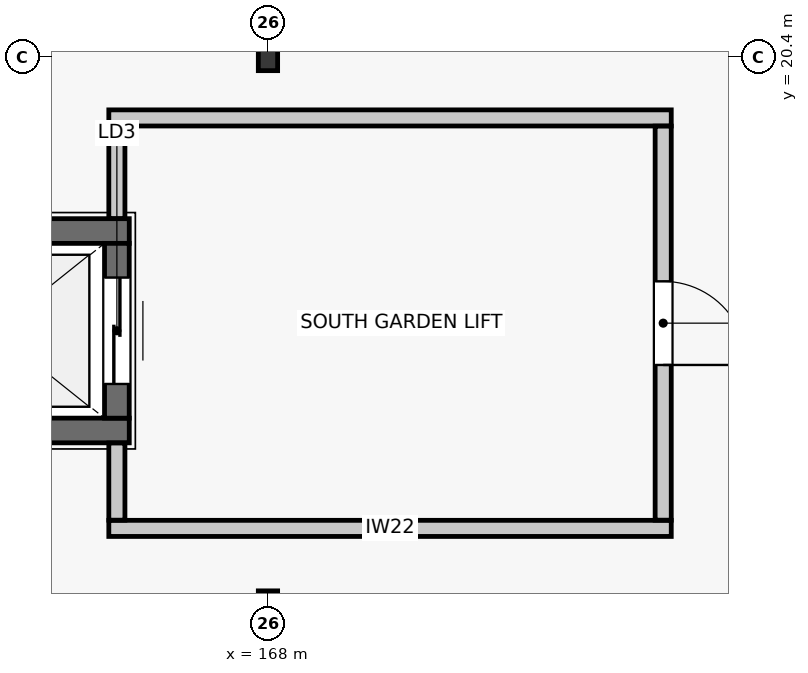
"""IFC4 building model, lengths in metres.
Left out: names, types, materials, properties, quantities, classifications, styles, units other than length and angle.
Written with IfcOpenShell. Run it as: python <this file> out.ifc"""

import sys

from ifc_helpers import new_model, si_unit, direction, frame, frame_2d, origin, origin_2d, place, context, subcontext, project, spatial, rectangle, i_section, extrude, element, fill, save


model = new_model("IFC4")
c1 = context("Model", 3, precision=1e-05, world=origin(), true_north=direction((0.0, 1.0)))
c2 = subcontext(c1, "Body", "Model", "MODEL_VIEW")
j1 = project(units=[si_unit("LENGTHUNIT", "METRE"), si_unit("PLANEANGLEUNIT", "RADIAN")], contexts=[c1])
p1 = place(None, origin())
s1 = spatial("IfcSite", under=j1, at=p1, CompositionType="ELEMENT")
p2 = place(p1, origin())
s2 = spatial("IfcBuilding", under=s1, at=p2, CompositionType="ELEMENT")
p3 = place(p2, frame((0.0, 0.0, 13.2)))
s3 = spatial("IfcBuildingStorey", under=s2, at=p3, CompositionType="ELEMENT", Elevation=13.2)
for number, where, z_axis, x_axis in (
    (1, (168.0, 13.2, 0.0), (0.0, 0.0, 1.0), (1.0, 0.0, 0.0)),
    (2, (168.0, 20.4, 0.0), (0.0, 0.0, 1.0), (1.0, 0.0, 0.0)),
):
    element("IfcColumn", number, at=place(p3, frame(where, z_axis=z_axis, x_axis=x_axis)), inside=s3, PredefinedType="COLUMN", context=c2, shape_type="SweptSolid", body=[
        extrude(i_section(OverallWidth=0.254, OverallDepth=0.356, WebThickness=0.01, FlangeThickness=0.018, FilletRadius=0.015, at=origin_2d()), origin(), (0.0, 0.0, 1.0), 3.66),
    ])
for number, where, z_axis, x_axis in (
    (3, (166.175, 15.488, 0.0), (0.0, 0.0, 1.0), (-1.0, 0.0, 0.0)),
    (4, (162.625, 18.112, 0.0), (0.0, 0.0, 1.0), (1.0, 0.0, 0.0)),
):
    element("IfcWall", number, at=place(p3, frame(where, z_axis=z_axis, x_axis=x_axis)), inside=s3, PredefinedType="SHEAR", context=c2, shape_type="SweptSolid", body=[
        extrude(rectangle(XDim=3.55, YDim=0.325, at=frame_2d((1.775, 0.0))), origin(), (0.0, 0.0, 1.0), 3.4),
    ])
p4 = place(p3, frame((166.012, 17.95, 0.0), z_axis=(0.0, 0.0, 1.0), x_axis=(0.0, -1.0, 0.0)))
e5 = element("IfcWall", 5, at=p4, inside=s3, PredefinedType="SHEAR", context=c2, shape_type="SweptSolid", body=[
    extrude(rectangle(XDim=2.3, YDim=0.325, at=frame_2d((1.15, 0.0))), origin(), (0.0, 0.0, 1.0), 3.4),
])
p5 = place(p4, frame((0.45, 0.0, 0.0)))
e6 = element("IfcOpeningElement", 6, at=p5, cuts=e5, PredefinedType="OPENING", context=c2, shape_type="SweptSolid", body=[
    extrude(rectangle(XDim=1.4, YDim=2.3, at=frame_2d((0.7, 1.15))), frame((0.0, 0.172, 0.0), z_axis=(0.0, -1.0, 0.0), x_axis=(1.0, 0.0, 0.0)), (0.0, 0.0, 1.0), 0.345),
])
for number, where, z_axis, x_axis in (
    (7, (173.306, 14.2, 0.0), (0.0, 0.0, 1.0), (-1.0, 0.0, 0.0)),
    (8, (165.906, 19.6, 0.0), (0.0, 0.0, 1.0), (1.0, 0.0, 0.0)),
):
    element("IfcWall", number, at=place(p3, frame(where, z_axis=z_axis, x_axis=x_axis)), inside=s3, PredefinedType="PARTITIONING", context=c2, shape_type="SweptSolid", body=[
        extrude(rectangle(XDim=7.4, YDim=0.212, at=frame_2d((3.7, 0.0))), origin(), (0.0, 0.0, 1.0), 3.13),
    ])
p6 = place(p3, frame((166.012, 14.308, 0.0), z_axis=(0.0, 0.0, 1.0), x_axis=(0.0, 1.0, 0.0)))
e9 = element("IfcWall", 9, at=p6, inside=s3, PredefinedType="PARTITIONING", context=c2, shape_type="SweptSolid", body=[
    extrude(rectangle(XDim=1.015, YDim=0.212, at=frame_2d((0.507, 0.0))), origin(), (0.0, 0.0, 1.0), 3.13),
])
p7 = place(p3, frame((166.012, 18.277, 0.0), z_axis=(0.0, 0.0, 1.0), x_axis=(0.0, 1.0, 0.0)))
e10 = element("IfcWall", 10, at=p7, inside=s3, PredefinedType="PARTITIONING", context=c2, shape_type="SweptSolid", body=[
    extrude(rectangle(XDim=1.215, YDim=0.212, at=frame_2d((0.607, 0.0))), origin(), (0.0, 0.0, 1.0), 3.13),
])
p8 = place(p3, frame((173.2, 19.492, 0.0), z_axis=(0.0, 0.0, 1.0), x_axis=(0.0, -1.0, 0.0)))
e11 = element("IfcWall", 11, at=p8, inside=s3, PredefinedType="PARTITIONING", context=c2, shape_type="SweptSolid", body=[
    extrude(rectangle(XDim=5.184, YDim=0.212, at=frame_2d((2.592, 0.0))), origin(), (0.0, 0.0, 1.0), 3.13),
])
p9 = place(p8, frame((2.042, 0.0, 0.0)))
e12 = element("IfcOpeningElement", 12, at=p9, cuts=e11, PredefinedType="OPENING", context=c2, shape_type="SweptSolid", body=[
    extrude(rectangle(XDim=1.1, YDim=2.1, at=frame_2d((0.55, 1.05))), frame((0.0, 0.116, 0.0), z_axis=(0.0, -1.0, 0.0), x_axis=(1.0, 0.0, 0.0)), (0.0, 0.0, 1.0), 0.232),
])
p10 = place(p5, origin())
e13 = element("IfcDoor", 13, at=p10, inside=s3, OperationType="DOUBLE_DOOR_SLIDING", PredefinedType="DOOR", context=c2, shape_type="SweptSolid", body=[
    extrude(rectangle(XDim=1.4, YDim=2.3, at=frame_2d((0.7, 1.15))), frame((0.0, 0.025, 0.0), z_axis=(0.0, -1.0, 0.0), x_axis=(1.0, 0.0, 0.0)), (0.0, 0.0, 1.0), 0.05),
])
fill(e6, e13)
p11 = place(p9, origin())
e14 = element("IfcDoor", 14, at=p11, inside=s3, OperationType="SINGLE_SWING_RIGHT", PredefinedType="DOOR", context=c2, shape_type="SweptSolid", body=[
    extrude(rectangle(XDim=1.1, YDim=2.1, at=frame_2d((0.55, 1.05))), frame((0.0, 0.025, 0.0), z_axis=(0.0, -1.0, 0.0), x_axis=(1.0, 0.0, 0.0)), (0.0, 0.0, 1.0), 0.05),
])
fill(e12, e14)
save(model, sys.argv[1])
